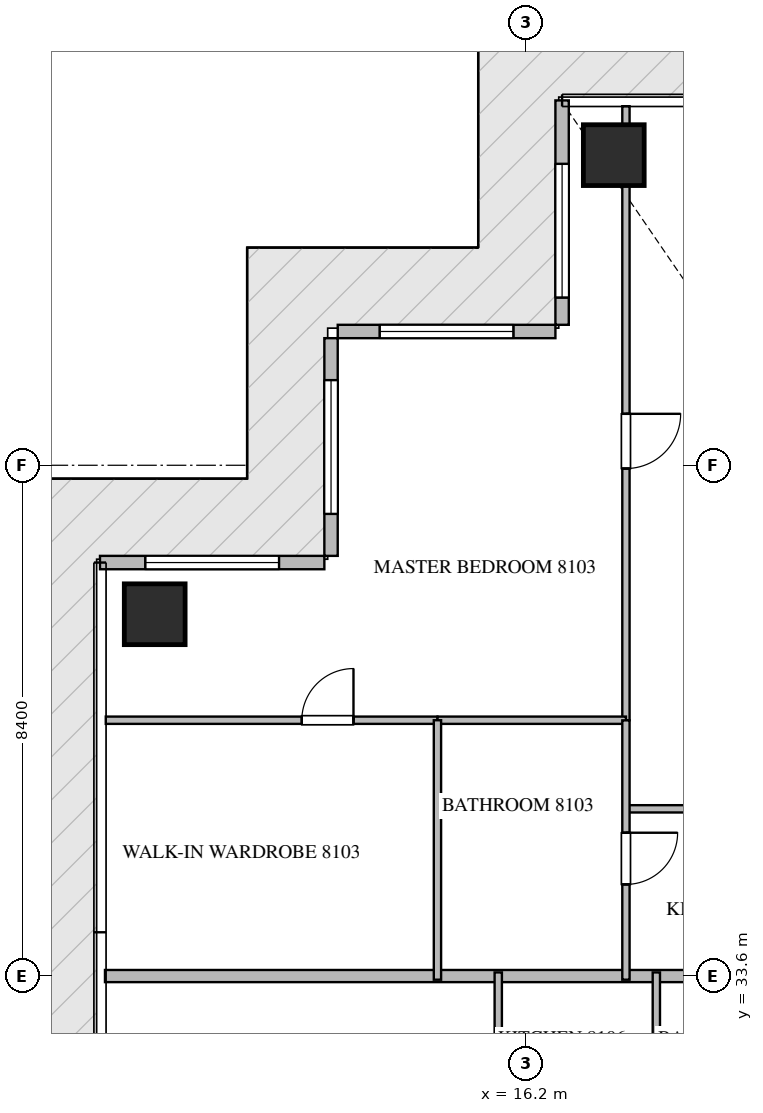
"""IFC4 building model, lengths in metres.
Left out: names, types, materials, properties, quantities, classifications, styles, units other than length and angle.
Written with IfcOpenShell. Run it as: python <this file> out.ifc"""

import sys

from ifc_helpers import new_model, si_unit, direction, frame, frame_2d, origin, origin_2d, place, context, subcontext, project, spatial, rectangle, extrude, source, transform, mapped, element, fill, save


model = new_model("IFC4")
c1 = context("Model", 3, precision=1e-05, world=origin(), true_north=direction((0.0, 1.0)))
c2 = subcontext(c1, "Body", "Model", "MODEL_VIEW")
j1 = project(units=[si_unit("LENGTHUNIT", "METRE"), si_unit("PLANEANGLEUNIT", "RADIAN")], contexts=[c1])
p1 = place(None, origin())
s1 = spatial("IfcSite", under=j1, at=p1, CompositionType="ELEMENT")
p2 = place(p1, origin())
s2 = spatial("IfcBuilding", under=s1, at=p2, CompositionType="ELEMENT")
p3 = place(p2, frame((0.0, 0.0, 325.85)))
s3 = spatial("IfcBuildingStorey", under=s2, at=p3, CompositionType="ELEMENT", Elevation=325.85)
m1 = source(origin(), c2, "Body", "SweptSolid", [
    extrude(rectangle(XDim=1.0, YDim=1.0, at=origin_2d()), origin(), (0.0, 0.0, 1.0), 4.05),
])
for number, where, z_axis, x_axis in (
    (1, (17.65, 47.1, -0.26), (0.0, 0.0, 1.0), (1.0, 0.0, 0.0)),
    (2, (10.1, 39.55, -0.26), (0.0, 0.0, 1.0), (1.0, 0.0, 0.0)),
):
    element("IfcColumn", number, at=place(p3, frame(where, z_axis=z_axis, x_axis=x_axis)), inside=s3, PredefinedType="COLUMN", context=c2, shape_type="MappedRepresentation", body=[
        mapped(m1, transform((0.0, 0.0, 0.0), scale=1.0)),
    ])
p4 = place(p3, frame((16.8, 48.0, 0.0), z_axis=(0.0, 0.0, 1.0), x_axis=(0.0, -1.0, 0.0)))
e3 = element("IfcWall", 3, at=p4, inside=s3, PredefinedType="ELEMENTEDWALL", context=c2, shape_type="SweptSolid", body=[
    extrude(rectangle(XDim=3.69, YDim=0.22, at=frame_2d((1.845, 0.0))), origin(), (0.0, 0.0, 1.0), 3.775),
])
p5 = place(p4, frame((1.043, 0.0, 0.65)))
e4 = element("IfcOpeningElement", 4, at=p5, cuts=e3, PredefinedType="OPENING", context=c2, shape_type="SweptSolid", body=[
    extrude(rectangle(XDim=2.2, YDim=2.4, at=frame_2d((1.1, 1.2))), frame((0.0, 0.12, 0.0), z_axis=(0.0, -1.0, 0.0), x_axis=(1.0, 0.0, 0.0)), (0.0, 0.0, 1.0), 0.24),
])
p6 = place(p3, frame((16.69, 44.2, 0.0), z_axis=(0.0, 0.0, 1.0), x_axis=(-1.0, 0.0, 0.0)))
e5 = element("IfcWall", 5, at=p6, inside=s3, PredefinedType="ELEMENTEDWALL", context=c2, shape_type="SweptSolid", body=[
    extrude(rectangle(XDim=3.58, YDim=0.22, at=frame_2d((1.79, 0.0))), origin(), (0.0, 0.0, 1.0), 3.775),
])
p7 = place(p6, frame((0.69, 0.0, 0.65)))
e6 = element("IfcOpeningElement", 6, at=p7, cuts=e5, PredefinedType="OPENING", context=c2, shape_type="SweptSolid", body=[
    extrude(rectangle(XDim=2.2, YDim=2.4, at=frame_2d((1.1, 1.2))), frame((0.0, 0.12, 0.0), z_axis=(0.0, -1.0, 0.0), x_axis=(1.0, 0.0, 0.0)), (0.0, 0.0, 1.0), 0.24),
])
p8 = place(p3, frame((13.0, 44.09, 0.0), z_axis=(0.0, 0.0, 1.0), x_axis=(0.0, -1.0, 0.0)))
e7 = element("IfcWall", 7, at=p8, inside=s3, PredefinedType="ELEMENTEDWALL", context=c2, shape_type="SweptSolid", body=[
    extrude(rectangle(XDim=3.58, YDim=0.22, at=frame_2d((1.79, 0.0))), origin(), (0.0, 0.0, 1.0), 3.775),
])
p9 = place(p8, frame((0.69, 0.0, 0.65)))
e8 = element("IfcOpeningElement", 8, at=p9, cuts=e7, PredefinedType="OPENING", context=c2, shape_type="SweptSolid", body=[
    extrude(rectangle(XDim=2.2, YDim=2.4, at=frame_2d((1.1, 1.2))), frame((0.0, 0.12, 0.0), z_axis=(0.0, -1.0, 0.0), x_axis=(1.0, 0.0, 0.0)), (0.0, 0.0, 1.0), 0.24),
])
p10 = place(p3, frame((12.89, 40.4, 0.0), z_axis=(0.0, 0.0, 1.0), x_axis=(-1.0, 0.0, 0.0)))
e9 = element("IfcWall", 9, at=p10, inside=s3, PredefinedType="ELEMENTEDWALL", context=c2, shape_type="SweptSolid", body=[
    extrude(rectangle(XDim=3.69, YDim=0.22, at=frame_2d((1.845, 0.0))), origin(), (0.0, 0.0, 1.0), 3.775),
])
p11 = place(p10, frame((0.745, 0.0, 0.65)))
e10 = element("IfcOpeningElement", 10, at=p11, cuts=e9, PredefinedType="OPENING", context=c2, shape_type="SweptSolid", body=[
    extrude(rectangle(XDim=2.2, YDim=2.4, at=frame_2d((1.1, 1.2))), frame((0.0, 0.12, 0.0), z_axis=(0.0, -1.0, 0.0), x_axis=(1.0, 0.0, 0.0)), (0.0, 0.0, 1.0), 0.24),
])
p12 = place(p3, frame((9.282, 33.6, 0.0), z_axis=(0.0, 0.0, 1.0), x_axis=(1.0, 0.0, 0.0)))
e11 = element("IfcWall", 11, at=p12, inside=s3, PredefinedType="PARTITIONING", context=c2, shape_type="SweptSolid", body=[
    extrude(rectangle(XDim=11.618, YDim=0.2, at=frame_2d((5.809, 0.0))), origin(), (0.0, 0.0, 1.0), 3.79),
])
p13 = place(p3, frame((17.85, 36.35, 0.0), z_axis=(0.0, 0.0, 1.0), x_axis=(1.0, 0.0, 0.0)))
e12 = element("IfcWall", 12, at=p13, inside=s3, PredefinedType="PARTITIONING", context=c2, shape_type="SweptSolid", body=[
    extrude(rectangle(XDim=2.85, YDim=0.12, at=frame_2d((1.425, 0.0))), origin(), (0.0, 0.0, 1.0), 3.472),
])
p14 = place(p13, frame((1.0, 0.0, 0.0)))
e13 = element("IfcOpeningElement", 13, at=p14, cuts=e12, PredefinedType="OPENING", context=c2, shape_type="SweptSolid", body=[
    extrude(rectangle(XDim=0.85, YDim=2.1, at=frame_2d((0.425, 1.05))), frame((0.0, 0.07, 0.0), z_axis=(0.0, -1.0, 0.0), x_axis=(1.0, 0.0, 0.0)), (0.0, 0.0, 1.0), 0.14),
])
p15 = place(p3, frame((17.85, 47.905, 0.0), z_axis=(0.0, 0.0, 1.0), x_axis=(0.0, -1.0, 0.0)))
e14 = element("IfcWall", 14, at=p15, inside=s3, PredefinedType="PARTITIONING", context=c2, shape_type="SweptSolid", body=[
    extrude(rectangle(XDim=10.098, YDim=0.12, at=frame_2d((5.049, 0.0))), origin(), (0.0, 0.0, 1.0), 3.292),
])
p16 = place(p15, frame((5.059, 0.0, 0.0)))
e15 = element("IfcOpeningElement", 15, at=p16, cuts=e14, PredefinedType="OPENING", context=c2, shape_type="SweptSolid", body=[
    extrude(rectangle(XDim=0.9, YDim=2.1, at=frame_2d((0.45, 1.05))), frame((0.0, 0.07, 0.0), z_axis=(0.0, -1.0, 0.0), x_axis=(1.0, 0.0, 0.0)), (0.0, 0.0, 1.0), 0.14),
])
p17 = place(p3, frame((9.295, 37.807, 0.0), z_axis=(0.0, 0.0, 1.0), x_axis=(1.0, 0.0, 0.0)))
e16 = element("IfcWall", 16, at=p17, inside=s3, PredefinedType="PARTITIONING", context=c2, shape_type="SweptSolid", body=[
    extrude(rectangle(XDim=5.455, YDim=0.12, at=frame_2d((2.728, 0.0))), origin(), (0.0, 0.0, 1.0), 3.79),
])
p18 = place(p17, frame((3.224, 0.0, 0.0)))
e17 = element("IfcOpeningElement", 17, at=p18, cuts=e16, PredefinedType="OPENING", context=c2, shape_type="SweptSolid", body=[
    extrude(rectangle(XDim=0.85, YDim=2.1, at=frame_2d((0.425, 1.05))), frame((0.0, 0.07, 0.0), z_axis=(0.0, -1.0, 0.0), x_axis=(1.0, 0.0, 0.0)), (0.0, 0.0, 1.0), 0.14),
])
p19 = place(p3, frame((14.752, 37.807, 0.0), z_axis=(0.0, 0.0, 1.0), x_axis=(1.0, 0.0, 0.0)))
e18 = element("IfcWall", 18, at=p19, inside=s3, PredefinedType="PARTITIONING", context=c2, shape_type="SweptSolid", body=[
    extrude(rectangle(XDim=3.098, YDim=0.12, at=frame_2d((1.549, 0.0))), origin(), (0.0, 0.0, 1.0), 3.79),
])
p20 = place(p3, frame((14.75, 37.807, 0.0), z_axis=(0.0, 0.0, 1.0), x_axis=(0.0, -1.0, 0.0)))
e19 = element("IfcWall", 19, at=p20, inside=s3, PredefinedType="PARTITIONING", context=c2, shape_type="SweptSolid", body=[
    extrude(rectangle(XDim=4.267, YDim=0.12, at=frame_2d((2.133, 0.0))), origin(), (0.0, 0.0, 1.0), 3.79),
])
p21 = place(p3, frame((17.85, 37.805, 0.0), z_axis=(0.0, 0.0, 1.0), x_axis=(0.0, -1.0, 0.0)))
e20 = element("IfcWall", 20, at=p21, inside=s3, PredefinedType="PARTITIONING", context=c2, shape_type="SweptSolid", body=[
    extrude(rectangle(XDim=4.265, YDim=0.12, at=frame_2d((2.132, 0.0))), origin(), (0.0, 0.0, 1.0), 3.372),
])
p22 = place(p21, frame((1.848, 0.0, 0.0)))
e21 = element("IfcOpeningElement", 21, at=p22, cuts=e20, PredefinedType="OPENING", context=c2, shape_type="SweptSolid", body=[
    extrude(rectangle(XDim=0.85, YDim=2.1, at=frame_2d((0.425, 1.05))), frame((0.0, 0.07, 0.0), z_axis=(0.0, -1.0, 0.0), x_axis=(1.0, 0.0, 0.0)), (0.0, 0.0, 1.0), 0.14),
])
for number, where, z_axis, x_axis in (
    (22, (18.35, 31.0, 0.0), (0.0, 0.0, 1.0), (0.0, 1.0, 0.0)),
    (23, (15.75, 31.0, 0.0), (0.0, 0.0, 1.0), (0.0, 1.0, 0.0)),
):
    element("IfcWall", number, at=place(p3, frame(where, z_axis=z_axis, x_axis=x_axis)), inside=s3, PredefinedType="PARTITIONING", context=c2, shape_type="SweptSolid", body=[
        extrude(rectangle(XDim=2.66, YDim=0.12, at=frame_2d((1.33, 0.0))), origin(), (0.0, 0.0, 1.0), 3.79),
    ])
m2 = source(origin(), c2, "Body", "SweptSolid", [
    extrude(rectangle(XDim=2.2, YDim=2.4, at=frame_2d((1.1, 1.2))), frame((0.0, 0.03, 0.0), z_axis=(0.0, -1.0, 0.0), x_axis=(1.0, 0.0, 0.0)), (0.0, 0.0, 1.0), 0.06),
])
p23 = place(p5, origin())
e24 = element("IfcWindow", 24, at=p23, inside=s3, PartitioningType="SINGLE_PANEL", PredefinedType="WINDOW", context=c2, shape_type="MappedRepresentation", body=[
    mapped(m2, transform((0.0, 0.0, 0.0), scale=1.0)),
])
fill(e4, e24)
p24 = place(p7, origin())
e25 = element("IfcWindow", 25, at=p24, inside=s3, PartitioningType="SINGLE_PANEL", PredefinedType="WINDOW", context=c2, shape_type="MappedRepresentation", body=[
    mapped(m2, transform((0.0, 0.0, 0.0), scale=1.0)),
])
fill(e6, e25)
p25 = place(p9, origin())
e26 = element("IfcWindow", 26, at=p25, inside=s3, PartitioningType="SINGLE_PANEL", PredefinedType="WINDOW", context=c2, shape_type="MappedRepresentation", body=[
    mapped(m2, transform((0.0, 0.0, 0.0), scale=1.0)),
])
fill(e8, e26)
p26 = place(p11, origin())
e27 = element("IfcWindow", 27, at=p26, inside=s3, PartitioningType="SINGLE_PANEL", PredefinedType="WINDOW", context=c2, shape_type="MappedRepresentation", body=[
    mapped(m2, transform((0.0, 0.0, 0.0), scale=1.0)),
])
fill(e10, e27)
m3 = source(origin(), c2, "Body", "SweptSolid", [
    extrude(rectangle(XDim=0.9, YDim=2.1, at=frame_2d((0.45, 1.05))), frame((0.0, 0.025, 0.0), z_axis=(0.0, -1.0, 0.0), x_axis=(1.0, 0.0, 0.0)), (0.0, 0.0, 1.0), 0.05),
])
p27 = place(p16, origin())
e28 = element("IfcDoor", 28, at=p27, inside=s3, OperationType="SINGLE_SWING_LEFT", PredefinedType="DOOR", context=c2, shape_type="MappedRepresentation", body=[
    mapped(m3, transform((0.0, 0.0, 0.0), scale=1.0)),
])
fill(e15, e28)
m4 = source(origin(), c2, "Body", "SweptSolid", [
    extrude(rectangle(XDim=0.85, YDim=2.1, at=frame_2d((0.425, 1.05))), frame((0.0, 0.025, 0.0), z_axis=(0.0, -1.0, 0.0), x_axis=(1.0, 0.0, 0.0)), (0.0, 0.0, 1.0), 0.05),
])
p28 = place(p18, origin())
e29 = element("IfcDoor", 29, at=p28, inside=s3, OperationType="SINGLE_SWING_RIGHT", PredefinedType="DOOR", context=c2, shape_type="MappedRepresentation", body=[
    mapped(m4, transform((0.0, 0.0, 0.0), scale=1.0)),
])
fill(e17, e29)
p29 = place(p22, origin())
e30 = element("IfcDoor", 30, at=p29, inside=s3, OperationType="SINGLE_SWING_LEFT", PredefinedType="DOOR", context=c2, shape_type="MappedRepresentation", body=[
    mapped(m4, transform((0.0, 0.0, 0.0), scale=1.0)),
])
fill(e21, e30)
save(model, sys.argv[1])
